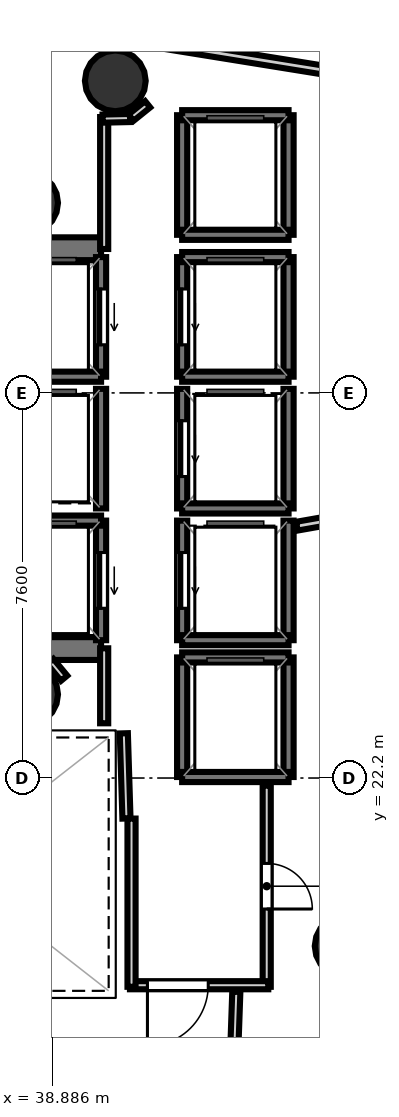
"""IFC4 building model, lengths in metres.
Left out: names, types, materials, properties, quantities, classifications, styles, units other than length and angle.
Written with IfcOpenShell. Run it as: python <this file> out.ifc"""

import sys

from ifc_helpers import new_model, si_unit, direction, frame, frame_2d, origin, origin_2d, place, context, subcontext, project, spatial, rectangle, hollow_circle, extrude, element, fill, save


model = new_model("IFC4")
c1 = context("Model", 3, precision=1e-05, world=origin(), true_north=direction((0.0, 1.0)))
c2 = subcontext(c1, "Body", "Model", "MODEL_VIEW")
j1 = project(units=[si_unit("LENGTHUNIT", "METRE"), si_unit("PLANEANGLEUNIT", "RADIAN")], contexts=[c1])
p1 = place(None, origin())
s1 = spatial("IfcSite", under=j1, at=p1, CompositionType="ELEMENT")
p2 = place(p1, origin())
s2 = spatial("IfcBuilding", under=s1, at=p2, CompositionType="ELEMENT")
p3 = place(p2, frame((0.0, 0.0, 211.4)))
s3 = spatial("IfcBuildingStorey", under=s2, at=p3, CompositionType="ELEMENT", Elevation=211.4)
p4 = place(p3, frame((29.33, 32.645, 0.0), z_axis=(0.0, 0.0, 1.0), x_axis=(1.0, 0.0, 0.0)))
e1 = element("IfcWall", 1, at=p4, inside=s3, PredefinedType="SHEAR", context=c2, shape_type="SweptSolid", body=[
    extrude(rectangle(XDim=10.52, YDim=0.45, at=frame_2d((5.26, 0.0))), origin(), (0.0, 0.0, 1.0), 3.52),
])
p5 = place(p4, frame((0.895, 0.0, 0.0)))
e2 = element("IfcOpeningElement", 2, at=p5, cuts=e1, PredefinedType="OPENING", context=c2, shape_type="SweptSolid", body=[
    extrude(rectangle(XDim=1.25, YDim=2.15, at=frame_2d((0.625, 1.075))), frame((0.0, 0.235, 0.0), z_axis=(0.0, -1.0, 0.0), x_axis=(1.0, 0.0, 0.0)), (0.0, 0.0, 1.0), 0.47),
])
p6 = place(p3, frame((29.33, 24.755, 0.0), z_axis=(0.0, 0.0, 1.0), x_axis=(1.0, 0.0, 0.0)))
e3 = element("IfcWall", 3, at=p6, inside=s3, PredefinedType="SHEAR", context=c2, shape_type="SweptSolid", body=[
    extrude(rectangle(XDim=10.52, YDim=0.45, at=frame_2d((5.26, 0.0))), origin(), (0.0, 0.0, 1.0), 3.52),
])
p7 = place(p6, frame((0.695, 0.0, 0.0)))
e4 = element("IfcOpeningElement", 4, at=p7, cuts=e3, PredefinedType="OPENING", context=c2, shape_type="SweptSolid", body=[
    extrude(rectangle(XDim=1.25, YDim=2.15, at=frame_2d((0.625, 1.075))), frame((0.0, 0.235, 0.0), z_axis=(0.0, -1.0, 0.0), x_axis=(1.0, 0.0, 0.0)), (0.0, 0.0, 1.0), 0.47),
])
for number, where, z_axis, x_axis in (
    (5, (38.4, 33.55, 0.0), (0.0, 0.0, 1.0), (1.0, 0.0, 0.0)),
    (6, (38.4, 23.85, 0.0), (0.0, 0.0, 1.0), (1.0, 0.0, 0.0)),
    (7, (40.131, 35.958, 0.0), (0.0, 0.0, 1.0), (1.0, 0.0, 0.0)),
    (8, (44.667, 18.883, 0.0), (0.0, 0.0, 1.0), (1.0, 0.0, 0.0)),
):
    element("IfcColumn", number, at=place(p3, frame(where, z_axis=z_axis, x_axis=x_axis)), inside=s3, PredefinedType="COLUMN", context=c2, shape_type="SweptSolid", body=[
        extrude(hollow_circle(Radius=0.6, WallThickness=0.03, at=origin_2d()), origin(), (0.0, 0.0, 1.0), 3.7),
    ])
p8 = place(p3, frame((39.85, 30.12, 0.0), z_axis=(0.0, 0.0, 1.0), x_axis=(0.0, 1.0, 0.0)))
e9 = element("IfcWall", 9, at=p8, inside=s3, PredefinedType="SOLIDWALL", context=c2, shape_type="SweptSolid", body=[
    extrude(rectangle(XDim=2.36, YDim=0.2, at=frame_2d((1.18, 0.0))), origin(), (0.0, 0.0, 1.0), 3.52),
])
p9 = place(p8, frame((0.63, 0.0, 0.0)))
e10 = element("IfcOpeningElement", 10, at=p9, cuts=e9, PredefinedType="OPENING", context=c2, shape_type="SweptSolid", body=[
    extrude(rectangle(XDim=1.1, YDim=2.15, at=frame_2d((0.55, 1.075))), frame((0.0, 0.11, 0.0), z_axis=(0.0, -1.0, 0.0), x_axis=(1.0, 0.0, 0.0)), (0.0, 0.0, 1.0), 0.22),
])
p10 = place(p3, frame((37.75, 30.12, 0.0), z_axis=(0.0, 0.0, 1.0), x_axis=(1.0, 0.0, 0.0)))
e11 = element("IfcWall", 11, at=p10, inside=s3, PredefinedType="SOLIDWALL", context=c2, shape_type="SweptSolid", body=[
    extrude(rectangle(XDim=2.1, YDim=0.2, at=frame_2d((1.05, 0.0))), origin(), (0.0, 0.0, 1.0), 3.52),
])
p11 = place(p3, frame((39.85, 24.92, 0.0), z_axis=(0.0, 0.0, 1.0), x_axis=(0.0, 1.0, 0.0)))
e12 = element("IfcWall", 12, at=p11, inside=s3, PredefinedType="SOLIDWALL", context=c2, shape_type="SweptSolid", body=[
    extrude(rectangle(XDim=2.36, YDim=0.2, at=frame_2d((1.18, 0.0))), origin(), (0.0, 0.0, 1.0), 3.52),
])
p12 = place(p11, frame((0.63, 0.0, 0.0)))
e13 = element("IfcOpeningElement", 13, at=p12, cuts=e12, PredefinedType="OPENING", context=c2, shape_type="SweptSolid", body=[
    extrude(rectangle(XDim=1.1, YDim=2.15, at=frame_2d((0.55, 1.075))), frame((0.0, 0.11, 0.0), z_axis=(0.0, -1.0, 0.0), x_axis=(1.0, 0.0, 0.0)), (0.0, 0.0, 1.0), 0.22),
])
p13 = place(p3, frame((37.75, 27.28, 0.0), z_axis=(0.0, 0.0, 1.0), x_axis=(1.0, 0.0, 0.0)))
e14 = element("IfcWall", 14, at=p13, inside=s3, PredefinedType="SOLIDWALL", context=c2, shape_type="SweptSolid", body=[
    extrude(rectangle(XDim=2.1, YDim=0.2, at=frame_2d((1.05, 0.0))), origin(), (0.0, 0.0, 1.0), 3.52),
])
p14 = place(p3, frame((43.55, 30.12, 0.0), z_axis=(0.0, 0.0, 1.0), x_axis=(0.0, 1.0, 0.0)))
e15 = element("IfcWall", 15, at=p14, inside=s3, PredefinedType="SOLIDWALL", context=c2, shape_type="SweptSolid", body=[
    extrude(rectangle(XDim=2.36, YDim=0.2, at=frame_2d((1.18, 0.0))), origin(), (0.0, 0.0, 1.0), 3.52),
])
p15 = place(p3, frame((41.45, 30.12, 0.0), z_axis=(0.0, 0.0, 1.0), x_axis=(0.0, 1.0, 0.0)))
e16 = element("IfcWall", 16, at=p15, inside=s3, PredefinedType="SOLIDWALL", context=c2, shape_type="SweptSolid", body=[
    extrude(rectangle(XDim=2.36, YDim=0.2, at=frame_2d((1.18, 0.0))), origin(), (0.0, 0.0, 1.0), 3.52),
])
p16 = place(p15, frame((0.63, 0.0, 0.0)))
e17 = element("IfcOpeningElement", 17, at=p16, cuts=e16, PredefinedType="OPENING", context=c2, shape_type="SweptSolid", body=[
    extrude(rectangle(XDim=1.1, YDim=2.15, at=frame_2d((0.55, 1.075))), frame((0.0, 0.11, 0.0), z_axis=(0.0, -1.0, 0.0), x_axis=(1.0, 0.0, 0.0)), (0.0, 0.0, 1.0), 0.22),
])
for number, where, z_axis, x_axis in (
    (18, (41.45, 32.48, 0.0), (0.0, 0.0, 1.0), (1.0, 0.0, 0.0)),
    (19, (41.45, 30.12, 0.0), (0.0, 0.0, 1.0), (1.0, 0.0, 0.0)),
):
    element("IfcWall", number, at=place(p3, frame(where, z_axis=z_axis, x_axis=x_axis)), inside=s3, PredefinedType="SOLIDWALL", context=c2, shape_type="SweptSolid", body=[
        extrude(rectangle(XDim=2.1, YDim=0.2, at=frame_2d((1.05, 0.0))), origin(), (0.0, 0.0, 1.0), 3.52),
    ])
p17 = place(p3, frame((43.55, 27.52, 0.0), z_axis=(0.0, 0.0, 1.0), x_axis=(0.0, 1.0, 0.0)))
e20 = element("IfcWall", 20, at=p17, inside=s3, PredefinedType="SOLIDWALL", context=c2, shape_type="SweptSolid", body=[
    extrude(rectangle(XDim=2.36, YDim=0.2, at=frame_2d((1.18, 0.0))), origin(), (0.0, 0.0, 1.0), 3.52),
])
p18 = place(p3, frame((41.45, 27.52, 0.0), z_axis=(0.0, 0.0, 1.0), x_axis=(0.0, 1.0, 0.0)))
e21 = element("IfcWall", 21, at=p18, inside=s3, PredefinedType="SOLIDWALL", context=c2, shape_type="SweptSolid", body=[
    extrude(rectangle(XDim=2.36, YDim=0.2, at=frame_2d((1.18, 0.0))), origin(), (0.0, 0.0, 1.0), 3.52),
])
p19 = place(p18, frame((0.63, 0.0, 0.0)))
e22 = element("IfcOpeningElement", 22, at=p19, cuts=e21, PredefinedType="OPENING", context=c2, shape_type="SweptSolid", body=[
    extrude(rectangle(XDim=1.1, YDim=2.15, at=frame_2d((0.55, 1.075))), frame((0.0, 0.11, 0.0), z_axis=(0.0, -1.0, 0.0), x_axis=(1.0, 0.0, 0.0)), (0.0, 0.0, 1.0), 0.22),
])
p20 = place(p3, frame((41.45, 27.52, 0.0), z_axis=(0.0, 0.0, 1.0), x_axis=(1.0, 0.0, 0.0)))
e23 = element("IfcWall", 23, at=p20, inside=s3, PredefinedType="SOLIDWALL", context=c2, shape_type="SweptSolid", body=[
    extrude(rectangle(XDim=2.1, YDim=0.2, at=frame_2d((1.05, 0.0))), origin(), (0.0, 0.0, 1.0), 3.52),
])
p21 = place(p3, frame((43.55, 24.92, 0.0), z_axis=(0.0, 0.0, 1.0), x_axis=(0.0, 1.0, 0.0)))
e24 = element("IfcWall", 24, at=p21, inside=s3, PredefinedType="SOLIDWALL", context=c2, shape_type="SweptSolid", body=[
    extrude(rectangle(XDim=2.36, YDim=0.2, at=frame_2d((1.18, 0.0))), origin(), (0.0, 0.0, 1.0), 3.52),
])
p22 = place(p3, frame((41.45, 24.92, 0.0), z_axis=(0.0, 0.0, 1.0), x_axis=(0.0, 1.0, 0.0)))
e25 = element("IfcWall", 25, at=p22, inside=s3, PredefinedType="SOLIDWALL", context=c2, shape_type="SweptSolid", body=[
    extrude(rectangle(XDim=2.36, YDim=0.2, at=frame_2d((1.18, 0.0))), origin(), (0.0, 0.0, 1.0), 3.52),
])
p23 = place(p22, frame((0.63, 0.0, 0.0)))
e26 = element("IfcOpeningElement", 26, at=p23, cuts=e25, PredefinedType="OPENING", context=c2, shape_type="SweptSolid", body=[
    extrude(rectangle(XDim=1.1, YDim=2.15, at=frame_2d((0.55, 1.075))), frame((0.0, 0.11, 0.0), z_axis=(0.0, -1.0, 0.0), x_axis=(1.0, 0.0, 0.0)), (0.0, 0.0, 1.0), 0.22),
])
p24 = place(p3, frame((41.45, 24.92, 0.0), z_axis=(0.0, 0.0, 1.0), x_axis=(1.0, 0.0, 0.0)))
e27 = element("IfcWall", 27, at=p24, inside=s3, PredefinedType="SOLIDWALL", context=c2, shape_type="SweptSolid", body=[
    extrude(rectangle(XDim=2.1, YDim=0.2, at=frame_2d((1.05, 0.0))), origin(), (0.0, 0.0, 1.0), 3.52),
])
p25 = place(p3, frame((39.85, 27.52, 0.0), z_axis=(0.0, 0.0, 1.0), x_axis=(0.0, 1.0, 0.0)))
e28 = element("IfcWall", 28, at=p25, inside=s3, PredefinedType="SOLIDWALL", context=c2, shape_type="SweptSolid", body=[
    extrude(rectangle(XDim=2.36, YDim=0.2, at=frame_2d((1.18, 0.0))), origin(), (0.0, 0.0, 1.0), 3.52),
])
for number, where, z_axis, x_axis in (
    (29, (43.55, 22.22, 0.0), (0.0, 0.0, 1.0), (0.0, 1.0, 0.0)),
    (30, (41.45, 22.22, 0.0), (0.0, 0.0, 1.0), (0.0, 1.0, 0.0)),
):
    element("IfcWall", number, at=place(p3, frame(where, z_axis=z_axis, x_axis=x_axis)), inside=s3, PredefinedType="SOLIDWALL", context=c2, shape_type="SweptSolid", body=[
        extrude(rectangle(XDim=2.36, YDim=0.2, at=frame_2d((1.18, 0.0))), origin(), (0.0, 0.0, 1.0), 3.52),
    ])
for number, where, z_axis, x_axis in (
    (31, (41.45, 24.58, 0.0), (0.0, 0.0, 1.0), (1.0, 0.0, 0.0)),
    (32, (41.45, 22.22, 0.0), (0.0, 0.0, 1.0), (1.0, 0.0, 0.0)),
):
    element("IfcWall", number, at=place(p3, frame(where, z_axis=z_axis, x_axis=x_axis)), inside=s3, PredefinedType="SOLIDWALL", context=c2, shape_type="SweptSolid", body=[
        extrude(rectangle(XDim=2.1, YDim=0.2, at=frame_2d((1.05, 0.0))), origin(), (0.0, 0.0, 1.0), 3.52),
    ])
for number, where, z_axis, x_axis in (
    (33, (43.55, 32.92, 0.0), (0.0, 0.0, 1.0), (0.0, 1.0, 0.0)),
    (34, (41.45, 32.92, 0.0), (0.0, 0.0, 1.0), (0.0, 1.0, 0.0)),
):
    element("IfcWall", number, at=place(p3, frame(where, z_axis=z_axis, x_axis=x_axis)), inside=s3, PredefinedType="SOLIDWALL", context=c2, shape_type="SweptSolid", body=[
        extrude(rectangle(XDim=2.36, YDim=0.2, at=frame_2d((1.18, 0.0))), origin(), (0.0, 0.0, 1.0), 3.52),
    ])
for number, where, z_axis, x_axis in (
    (35, (41.45, 35.28, 0.0), (0.0, 0.0, 1.0), (1.0, 0.0, 0.0)),
    (36, (41.45, 32.92, 0.0), (0.0, 0.0, 1.0), (1.0, 0.0, 0.0)),
):
    element("IfcWall", number, at=place(p3, frame(where, z_axis=z_axis, x_axis=x_axis)), inside=s3, PredefinedType="SOLIDWALL", context=c2, shape_type="SweptSolid", body=[
        extrude(rectangle(XDim=2.1, YDim=0.2, at=frame_2d((1.05, 0.0))), origin(), (0.0, 0.0, 1.0), 3.52),
    ])
p26 = place(p3, frame((40.351, 21.401, 0.0), z_axis=(0.0, 0.0, 1.0), x_axis=(-0.031058045979, 0.999517582527, 0.0)))
e37 = element("IfcWall", 37, at=p26, inside=s3, PredefinedType="PARTITIONING", context=c2, shape_type="SweptSolid", body=[
    extrude(rectangle(XDim=1.682, YDim=0.16, at=frame_2d((0.841, 0.0))), origin(), (0.0, 0.0, 1.0), 2.84),
])
p27 = place(p3, frame((39.911, 23.28, 0.0), z_axis=(0.0, 0.0, 1.0), x_axis=(0.0, 1.0, 0.0)))
e38 = element("IfcWall", 38, at=p27, inside=s3, PredefinedType="PARTITIONING", context=c2, shape_type="SweptSolid", body=[
    extrude(rectangle(XDim=1.48, YDim=0.16, at=frame_2d((0.74, 0.0))), origin(), (0.0, 0.0, 1.0), 2.84),
])
p28 = place(p3, frame((39.911, 32.64, 0.0), z_axis=(0.0, 0.0, 1.0), x_axis=(0.0, 1.0, 0.0)))
e39 = element("IfcWall", 39, at=p28, inside=s3, PredefinedType="PARTITIONING", context=c2, shape_type="SweptSolid", body=[
    extrude(rectangle(XDim=2.604, YDim=0.16, at=frame_2d((1.302, 0.0))), origin(), (0.0, 0.0, 1.0), 2.84),
])
p29 = place(p3, frame((39.881, 35.213, 0.0), z_axis=(0.0, 0.0, 1.0), x_axis=(0.999756500784, 0.02206669754, 0.0)))
e40 = element("IfcWall", 40, at=p29, inside=s3, PredefinedType="PARTITIONING", context=c2, shape_type="SweptSolid", body=[
    extrude(rectangle(XDim=0.542, YDim=0.16, at=frame_2d((0.271, 0.0))), origin(), (0.0, 0.0, 1.0), 2.84),
])
p30 = place(p3, frame((40.441, 35.232, 0.0), z_axis=(0.0, 0.0, 1.0), x_axis=(0.778714564707, 0.627378376033, 0.0)))
e41 = element("IfcWall", 41, at=p30, inside=s3, PredefinedType="PARTITIONING", context=c2, shape_type="SweptSolid", body=[
    extrude(rectangle(XDim=0.421, YDim=0.16, at=frame_2d((0.21, 0.0))), origin(), (0.0, 0.0, 1.0), 2.84),
])
p31 = place(p3, frame((43.119, 22.05, 0.0), z_axis=(0.0, 0.0, 1.0), x_axis=(0.0, -1.0, 0.0)))
e42 = element("IfcWall", 42, at=p31, inside=s3, PredefinedType="PARTITIONING", context=c2, shape_type="SweptSolid", body=[
    extrude(rectangle(XDim=3.97, YDim=0.16, at=frame_2d((1.985, 0.0))), origin(), (0.0, 0.0, 1.0), 2.84),
])
p32 = place(p31, frame((1.535, 0.0, 0.0)))
e43 = element("IfcOpeningElement", 43, at=p32, cuts=e42, PredefinedType="OPENING", context=c2, shape_type="SweptSolid", body=[
    extrude(rectangle(XDim=0.9, YDim=2.1, at=frame_2d((0.45, 1.05))), frame((0.0, 0.09, 0.0), z_axis=(0.0, -1.0, 0.0), x_axis=(1.0, 0.0, 0.0)), (0.0, 0.0, 1.0), 0.18),
])
p33 = place(p3, frame((43.15, 18.111, 0.0), z_axis=(0.0, 0.0, 1.0), x_axis=(-1.0, 0.0, 0.0)))
e44 = element("IfcWall", 44, at=p33, inside=s3, PredefinedType="PARTITIONING", context=c2, shape_type="SweptSolid", body=[
    extrude(rectangle(XDim=2.73, YDim=0.16, at=frame_2d((1.365, 0.0))), origin(), (0.0, 0.0, 1.0), 2.84),
])
p34 = place(p33, frame((1.185, 0.0, 0.0)))
e45 = element("IfcOpeningElement", 45, at=p34, cuts=e44, PredefinedType="OPENING", context=c2, shape_type="SweptSolid", body=[
    extrude(rectangle(XDim=1.2, YDim=2.15, at=frame_2d((0.6, 1.075))), frame((0.0, 0.09, 0.0), z_axis=(0.0, -1.0, 0.0), x_axis=(1.0, 0.0, 0.0)), (0.0, 0.0, 1.0), 0.18),
])
p35 = place(p3, frame((40.451, 18.08, 0.0), z_axis=(0.0, 0.0, 1.0), x_axis=(0.0, 1.0, 0.0)))
e46 = element("IfcWall", 46, at=p35, inside=s3, PredefinedType="PARTITIONING", context=c2, shape_type="SweptSolid", body=[
    extrude(rectangle(XDim=3.32, YDim=0.16, at=frame_2d((1.66, 0.0))), origin(), (0.0, 0.0, 1.0), 2.84),
])
p36 = place(p3, frame((39.121, 24.17, 0.0), z_axis=(0.0, 0.0, 1.0), x_axis=(-0.638008265708, 0.770029514296, 0.0)))
e47 = element("IfcWall", 47, at=p36, inside=s3, PredefinedType="PARTITIONING", context=c2, shape_type="SweptSolid", body=[
    extrude(rectangle(XDim=0.431, YDim=0.16, at=frame_2d((0.215, 0.0))), origin(), (0.0, 0.0, 1.0), 2.84),
])
p37 = place(p3, frame((42.519, 17.981, 0.0), z_axis=(0.0, 0.0, 1.0), x_axis=(-0.034867127796, -0.999391956841, 0.0)))
e48 = element("IfcWall", 48, at=p37, inside=s3, PredefinedType="PARTITIONING", context=c2, shape_type="SweptSolid", body=[
    extrude(rectangle(XDim=3.074, YDim=0.16, at=frame_2d((1.537, 0.0))), origin(), (0.0, 0.0, 1.0), 2.84),
])
p38 = place(p3, frame((37.225, 37.301, 0.0), z_axis=(0.0, 0.0, 1.0), x_axis=(0.987268097612, -0.159065091827, 0.0)))
e49 = element("IfcWall", 49, at=p38, inside=s3, PredefinedType="PLUMBINGWALL", context=c2, shape_type="SweptSolid", body=[
    extrude(rectangle(XDim=11.926, YDim=0.175, at=frame_2d((5.963, 0.0))), origin(), (0.0, 0.0, 1.0), 2.84),
])
p39 = place(p3, frame((48.999, 28.102, 0.0), z_axis=(0.0, 0.0, 1.0), x_axis=(-0.984809658173, -0.173637372619, 0.0)))
e50 = element("IfcWall", 50, at=p39, inside=s3, PredefinedType="PLUMBINGWALL", context=c2, shape_type="SweptSolid", body=[
    extrude(rectangle(XDim=5.365, YDim=0.175, at=frame_2d((2.683, 0.0))), origin(), (0.0, 0.0, 1.0), 2.84),
])
p40 = place(p9, origin())
e51 = element("IfcDoor", 51, at=p40, inside=s3, OperationType="SLIDING_TO_LEFT", PredefinedType="DOOR", context=c2, shape_type="SweptSolid", body=[
    extrude(rectangle(XDim=1.1, YDim=2.15, at=frame_2d((0.55, 1.075))), frame((0.0, 0.025, 0.0), z_axis=(0.0, -1.0, 0.0), x_axis=(1.0, 0.0, 0.0)), (0.0, 0.0, 1.0), 0.05),
])
fill(e10, e51)
p41 = place(p12, origin())
e52 = element("IfcDoor", 52, at=p41, inside=s3, OperationType="SLIDING_TO_LEFT", PredefinedType="DOOR", context=c2, shape_type="SweptSolid", body=[
    extrude(rectangle(XDim=1.1, YDim=2.15, at=frame_2d((0.55, 1.075))), frame((0.0, 0.025, 0.0), z_axis=(0.0, -1.0, 0.0), x_axis=(1.0, 0.0, 0.0)), (0.0, 0.0, 1.0), 0.05),
])
fill(e13, e52)
p42 = place(p16, origin())
e53 = element("IfcDoor", 53, at=p42, inside=s3, OperationType="SLIDING_TO_LEFT", PredefinedType="DOOR", context=c2, shape_type="SweptSolid", body=[
    extrude(rectangle(XDim=1.1, YDim=2.15, at=frame_2d((0.55, 1.075))), frame((0.0, 0.025, 0.0), z_axis=(0.0, -1.0, 0.0), x_axis=(1.0, 0.0, 0.0)), (0.0, 0.0, 1.0), 0.05),
])
fill(e17, e53)
p43 = place(p19, origin())
e54 = element("IfcDoor", 54, at=p43, inside=s3, OperationType="SLIDING_TO_LEFT", PredefinedType="DOOR", context=c2, shape_type="SweptSolid", body=[
    extrude(rectangle(XDim=1.1, YDim=2.15, at=frame_2d((0.55, 1.075))), frame((0.0, 0.025, 0.0), z_axis=(0.0, -1.0, 0.0), x_axis=(1.0, 0.0, 0.0)), (0.0, 0.0, 1.0), 0.05),
])
fill(e22, e54)
p44 = place(p23, origin())
e55 = element("IfcDoor", 55, at=p44, inside=s3, OperationType="SLIDING_TO_LEFT", PredefinedType="DOOR", context=c2, shape_type="SweptSolid", body=[
    extrude(rectangle(XDim=1.1, YDim=2.15, at=frame_2d((0.55, 1.075))), frame((0.0, 0.025, 0.0), z_axis=(0.0, -1.0, 0.0), x_axis=(1.0, 0.0, 0.0)), (0.0, 0.0, 1.0), 0.05),
])
fill(e26, e55)
p45 = place(p34, origin())
e56 = element("IfcDoor", 56, at=p45, inside=s3, OperationType="SINGLE_SWING_RIGHT", PredefinedType="DOOR", context=c2, shape_type="SweptSolid", body=[
    extrude(rectangle(XDim=1.2, YDim=2.15, at=frame_2d((0.6, 1.075))), frame((0.0, 0.025, 0.0), z_axis=(0.0, -1.0, 0.0), x_axis=(1.0, 0.0, 0.0)), (0.0, 0.0, 1.0), 0.05),
])
fill(e45, e56)
p46 = place(p32, origin())
e57 = element("IfcDoor", 57, at=p46, inside=s3, OperationType="SINGLE_SWING_RIGHT", PredefinedType="DOOR", context=c2, shape_type="SweptSolid", body=[
    extrude(rectangle(XDim=0.9, YDim=2.1, at=frame_2d((0.45, 1.05))), frame((0.0, 0.025, 0.0), z_axis=(0.0, -1.0, 0.0), x_axis=(1.0, 0.0, 0.0)), (0.0, 0.0, 1.0), 0.05),
])
fill(e43, e57)
save(model, sys.argv[1])
